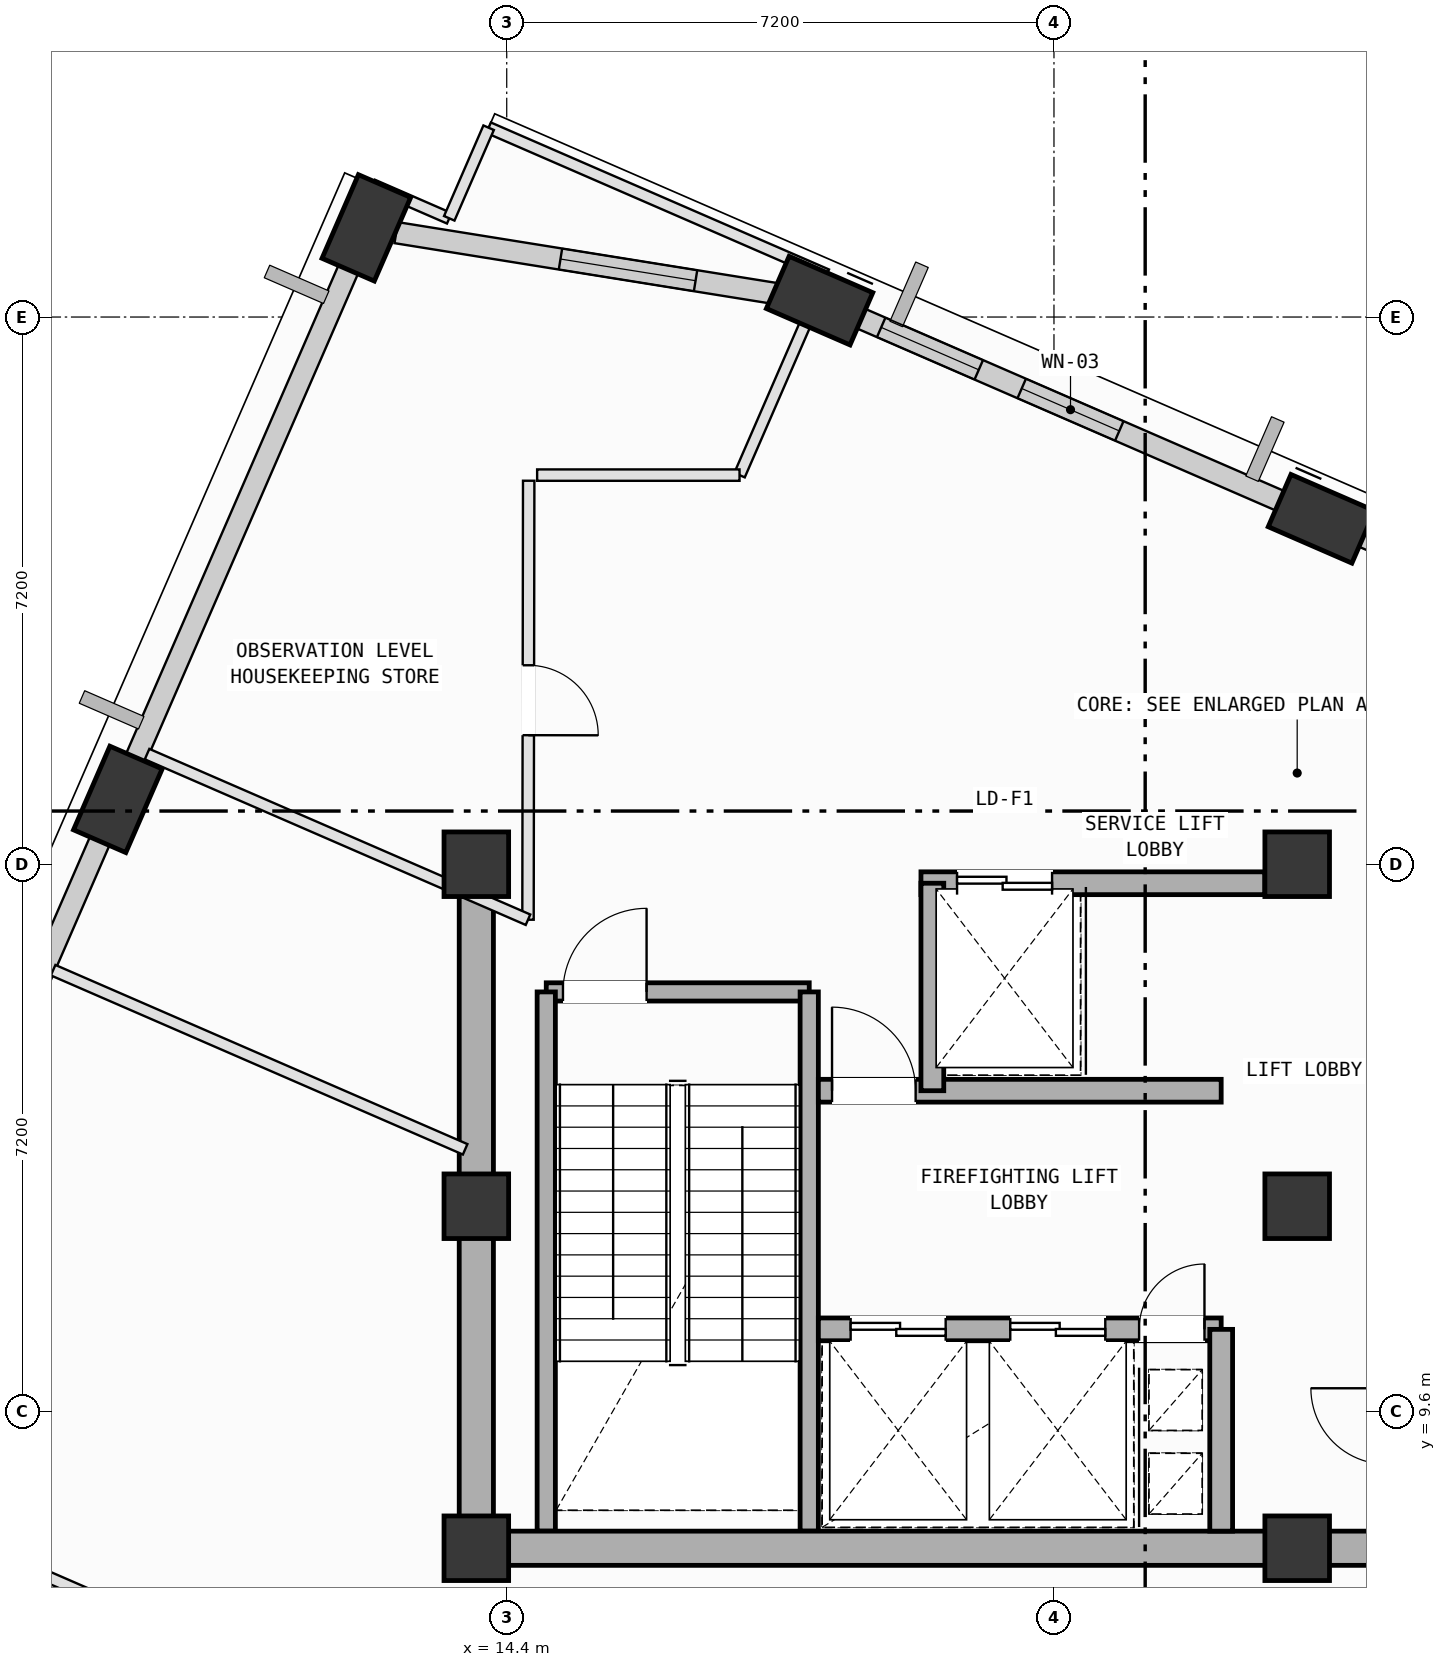
"""IFC4 building model, lengths in metres.
Left out: names, types, materials, properties, quantities, classifications, styles, units other than length and angle.
Written with IfcOpenShell. Run it as: python <this file> out.ifc"""

import sys

from ifc_helpers import new_model, si_unit, direction, frame, frame_2d, origin, origin_2d, place, context, subcontext, project, spatial, rectangle, extrude, element, fill, save


model = new_model("IFC4")
c1 = context("Model", 3, precision=1e-05, world=origin(), true_north=direction((0.0, 1.0)))
c2 = subcontext(c1, "Body", "Model", "MODEL_VIEW")
j1 = project(units=[si_unit("LENGTHUNIT", "METRE"), si_unit("PLANEANGLEUNIT", "RADIAN")], contexts=[c1])
p1 = place(None, origin())
s1 = spatial("IfcSite", under=j1, at=p1, CompositionType="ELEMENT")
p2 = place(p1, origin())
s2 = spatial("IfcBuilding", under=s1, at=p2, CompositionType="ELEMENT")
p3 = place(p2, frame((0.0, 0.0, 333.4)))
s3 = spatial("IfcBuildingStorey", under=s2, at=p3, CompositionType="ELEMENT", Elevation=333.4)
for number, where, z_axis, x_axis in (
    (1, (14.0, 7.8, 0.0), (0.0, 0.0, 1.0), (1.0, 0.0, 0.0)),
    (2, (14.0, 12.3, 0.0), (0.0, 0.0, 1.0), (1.0, 0.0, 0.0)),
    (3, (14.0, 16.8, 0.0), (0.0, 0.0, 1.0), (1.0, 0.0, 0.0)),
    (4, (24.8, 7.8, 0.0), (0.0, 0.0, 1.0), (1.0, 0.0, 0.0)),
    (5, (24.8, 12.3, 0.0), (0.0, 0.0, 1.0), (1.0, 0.0, 0.0)),
    (6, (24.8, 16.8, 0.0), (0.0, 0.0, 1.0), (1.0, 0.0, 0.0)),
):
    element("IfcColumn", number, at=place(p3, frame(where, z_axis=z_axis, x_axis=x_axis)), inside=s3, PredefinedType="COLUMN", context=c2, shape_type="SweptSolid", body=[
        extrude(rectangle(XDim=0.85, YDim=0.85, at=origin_2d()), origin(), (0.0, 0.0, 1.0), 4.8),
    ])
for number, where, z_axis, x_axis in (
    (7, (25.119, 21.345, 0.002), (0.0, 0.0, 1.0), (-0.917, 0.399, 0.0)),
    (8, (18.516, 24.216, 0.002), (0.0, 0.0, 1.0), (-0.917, 0.399, 0.0)),
    (9, (12.553, 25.173, 0.002), (0.0, 0.0, 1.0), (0.399, 0.917, 0.0)),
    (10, (9.283, 17.654, 0.002), (0.0, 0.0, 1.0), (0.399, 0.917, 0.0)),
):
    element("IfcColumn", number, at=place(p3, frame(where, z_axis=z_axis, x_axis=x_axis)), inside=s3, PredefinedType="COLUMN", context=c2, shape_type="SweptSolid", body=[
        extrude(rectangle(XDim=1.2, YDim=0.75, at=origin_2d()), origin(), (0.0, 0.0, 1.0), 4.796),
    ])
p4 = place(p3, frame((25.484, 21.187, 0.0), z_axis=(0.0, 0.0, 1.0), x_axis=(0.917060568388, -0.398747932794, 0.0)))
e11 = element("IfcWall", 11, at=p4, inside=s3, PredefinedType="SOLIDWALL", context=c2, shape_type="SweptSolid", body=[
    extrude(rectangle(XDim=6.955, YDim=0.28, at=frame_2d((3.478, 0.0))), origin(), (0.0, 0.0, 1.0), 3.485),
])
p5 = place(p3, frame((18.881, 24.058, 0.0), z_axis=(0.0, 0.0, 1.0), x_axis=(0.917070056253, -0.398726111414, 0.0)))
e12 = element("IfcWall", 12, at=p5, inside=s3, PredefinedType="SOLIDWALL", context=c2, shape_type="SweptSolid", body=[
    extrude(rectangle(XDim=6.405, YDim=0.28, at=frame_2d((3.202, 0.0))), origin(), (0.0, 0.0, 1.0), 3.985),
])
p6 = place(p5, frame((2.502, 0.0, 0.75)))
e13 = element("IfcOpeningElement", 13, at=p6, cuts=e12, PredefinedType="OPENING", context=c2, shape_type="SweptSolid", body=[
    extrude(rectangle(XDim=1.4, YDim=1.85, at=frame_2d((0.7, 0.925))), frame((0.0, 0.15, 0.0), z_axis=(0.0, -1.0, 0.0), x_axis=(1.0, 0.0, 0.0)), (0.0, 0.0, 1.0), 0.3),
])
p7 = place(p5, frame((0.486, 0.0, 0.75)))
e14 = element("IfcOpeningElement", 14, at=p7, cuts=e12, PredefinedType="OPENING", context=c2, shape_type="SweptSolid", body=[
    extrude(rectangle(XDim=1.4, YDim=1.85, at=frame_2d((0.7, 0.925))), frame((0.0, 0.15, 0.0), z_axis=(0.0, -1.0, 0.0), x_axis=(1.0, 0.0, 0.0)), (0.0, 0.0, 1.0), 0.3),
])
p8 = place(p3, frame((12.946, 25.11, 0.0), z_axis=(0.0, 0.0, 1.0), x_axis=(0.987363821305, -0.158469821666, 0.0)))
e15 = element("IfcWall", 15, at=p8, inside=s3, PredefinedType="SOLIDWALL", context=c2, shape_type="SweptSolid", body=[
    extrude(rectangle(XDim=5.244, YDim=0.28, at=frame_2d((2.622, 0.0))), origin(), (0.0, 0.0, 1.0), 3.985),
])
p9 = place(p8, frame((2.189, 0.0, 0.75)))
e16 = element("IfcOpeningElement", 16, at=p9, cuts=e15, PredefinedType="OPENING", context=c2, shape_type="SweptSolid", body=[
    extrude(rectangle(XDim=1.8, YDim=2.05, at=frame_2d((0.9, 1.025))), frame((0.0, 0.15, 0.0), z_axis=(0.0, -1.0, 0.0), x_axis=(1.0, 0.0, 0.0)), (0.0, 0.0, 1.0), 0.3),
])
p10 = place(p3, frame((9.442, 18.018, 0.0), z_axis=(0.0, 0.0, 1.0), x_axis=(0.398768305896, 0.917051709672, 0.0)))
e17 = element("IfcWall", 17, at=p10, inside=s3, PredefinedType="SOLIDWALL", context=c2, shape_type="SweptSolid", body=[
    extrude(rectangle(XDim=7.405, YDim=0.28, at=frame_2d((3.703, 0.0))), origin(), (0.0, 0.0, 1.0), 3.985),
])
p11 = place(p3, frame((6.172, 10.498, 0.0), z_axis=(0.0, 0.0, 1.0), x_axis=(0.398740578379, 0.917063766133, 0.0)))
e18 = element("IfcWall", 18, at=p11, inside=s3, PredefinedType="SOLIDWALL", context=c2, shape_type="SweptSolid", body=[
    extrude(rectangle(XDim=7.405, YDim=0.28, at=frame_2d((3.702, 0.0))), origin(), (0.0, 0.0, 1.0), 3.985),
])
p12 = place(p3, frame((8.509, 6.027, 0.0), z_axis=(0.0, 0.0, 1.0), x_axis=(-0.51924554751, 0.854625099907, 0.0)))
e19 = element("IfcWall", 19, at=p12, inside=s3, PredefinedType="SOLIDWALL", context=c2, shape_type="SweptSolid", body=[
    extrude(rectangle(XDim=4.407, YDim=0.28, at=frame_2d((2.204, 0.0))), origin(), (0.0, 0.0, 1.0), 3.985),
])
p13 = place(p3, frame((14.92, 15.12, 0.0), z_axis=(0.0, 0.0, 1.0), x_axis=(1.0, 0.0, 0.0)))
e20 = element("IfcWall", 20, at=p13, inside=s3, PredefinedType="SOLIDWALL", context=c2, shape_type="SweptSolid", body=[
    extrude(rectangle(XDim=3.46, YDim=0.24, at=frame_2d((1.73, 0.0))), origin(), (0.0, 0.0, 1.0), 4.5),
])
p14 = place(p13, frame((0.22, 0.0, 0.0)))
e21 = element("IfcOpeningElement", 21, at=p14, cuts=e20, PredefinedType="OPENING", context=c2, shape_type="SweptSolid", body=[
    extrude(rectangle(XDim=1.1, YDim=2.15, at=frame_2d((0.55, 1.075))), frame((0.0, 0.13, 0.0), z_axis=(0.0, -1.0, 0.0), x_axis=(1.0, 0.0, 0.0)), (0.0, 0.0, 1.0), 0.26),
])
for number, where, z_axis, x_axis in (
    (22, (18.38, 15.12, 0.0), (0.0, 0.0, 1.0), (0.0, -1.0, 0.0)),
    (23, (14.92, 8.025, 0.0), (0.0, 0.0, 1.0), (0.0, 1.0, 0.0)),
):
    element("IfcWall", number, at=place(p3, frame(where, z_axis=z_axis, x_axis=x_axis)), inside=s3, PredefinedType="SOLIDWALL", context=c2, shape_type="SweptSolid", body=[
        extrude(rectangle(XDim=7.095, YDim=0.24, at=frame_2d((3.548, 0.0))), origin(), (0.0, 0.0, 1.0), 4.5),
    ])
for number, where, z_axis, x_axis in (
    (24, (14.0, 7.8, 0.0), (0.0, 0.0, 1.0), (1.0, 0.0, 0.0)),
    (25, (24.8, 7.8, 0.0), (0.0, 0.0, 1.0), (1.0, 0.0, 0.0)),
):
    element("IfcWall", number, at=place(p3, frame(where, z_axis=z_axis, x_axis=x_axis)), inside=s3, PredefinedType="SHEAR", context=c2, shape_type="SweptSolid", body=[
        extrude(rectangle(XDim=10.8, YDim=0.45, at=frame_2d((5.4, 0.0))), origin(), (0.0, 0.0, 1.0), 4.5),
    ])
p15 = place(p3, frame((14.0, 16.8, 0.0), z_axis=(0.0, 0.0, 1.0), x_axis=(0.0, -1.0, 0.0)))
e26 = element("IfcWall", 26, at=p15, inside=s3, PredefinedType="SHEAR", context=c2, shape_type="SweptSolid", body=[
    extrude(rectangle(XDim=9.0, YDim=0.45, at=frame_2d((4.5, 0.0))), origin(), (0.0, 0.0, 1.0), 4.5),
])
p16 = place(p3, frame((19.85, 16.55, 0.0), z_axis=(0.0, 0.0, 1.0), x_axis=(1.0, 0.0, 0.0)))
e27 = element("IfcWall", 27, at=p16, inside=s3, PredefinedType="SOLIDWALL", context=c2, shape_type="SweptSolid", body=[
    extrude(rectangle(XDim=4.525, YDim=0.3, at=frame_2d((2.262, 0.0))), origin(), (0.0, 0.0, 1.0), 4.5),
])
p17 = place(p16, frame((0.475, 0.0, 0.0)))
e28 = element("IfcOpeningElement", 28, at=p17, cuts=e27, PredefinedType="OPENING", context=c2, shape_type="SweptSolid", body=[
    extrude(rectangle(XDim=1.25, YDim=2.18, at=frame_2d((0.625, 1.09))), frame((0.0, 0.16, 0.0), z_axis=(0.0, -1.0, 0.0), x_axis=(1.0, 0.0, 0.0)), (0.0, 0.0, 1.0), 0.32),
])
p18 = place(p3, frame((18.5, 10.68, 0.0), z_axis=(0.0, 0.0, 1.0), x_axis=(1.0, 0.0, 0.0)))
e29 = element("IfcWall", 29, at=p18, inside=s3, PredefinedType="SOLIDWALL", context=c2, shape_type="SweptSolid", body=[
    extrude(rectangle(XDim=5.3, YDim=0.3, at=frame_2d((2.65, 0.0))), origin(), (0.0, 0.0, 1.0), 4.5),
])
p19 = place(p18, frame((4.22, 0.0, 0.0)))
e30 = element("IfcOpeningElement", 30, at=p19, cuts=e29, PredefinedType="OPENING", context=c2, shape_type="SweptSolid", body=[
    extrude(rectangle(XDim=0.86, YDim=2.06, at=frame_2d((0.43, 1.03))), frame((0.0, 0.16, 0.0), z_axis=(0.0, -1.0, 0.0), x_axis=(1.0, 0.0, 0.0)), (0.0, 0.0, 1.0), 0.32),
])
p20 = place(p18, frame((0.425, 0.0, 0.0)))
e31 = element("IfcOpeningElement", 31, at=p20, cuts=e29, PredefinedType="OPENING", context=c2, shape_type="SweptSolid", body=[
    extrude(rectangle(XDim=1.25, YDim=2.18, at=frame_2d((0.625, 1.09))), frame((0.0, 0.16, 0.0), z_axis=(0.0, -1.0, 0.0), x_axis=(1.0, 0.0, 0.0)), (0.0, 0.0, 1.0), 0.32),
])
p21 = place(p18, frame((2.525, 0.0, 0.0)))
e32 = element("IfcOpeningElement", 32, at=p21, cuts=e29, PredefinedType="OPENING", context=c2, shape_type="SweptSolid", body=[
    extrude(rectangle(XDim=1.25, YDim=2.18, at=frame_2d((0.625, 1.09))), frame((0.0, 0.16, 0.0), z_axis=(0.0, -1.0, 0.0), x_axis=(1.0, 0.0, 0.0)), (0.0, 0.0, 1.0), 0.32),
])
p22 = place(p3, frame((18.5, 13.82, 0.0), z_axis=(0.0, 0.0, 1.0), x_axis=(1.0, 0.0, 0.0)))
e33 = element("IfcWall", 33, at=p22, inside=s3, PredefinedType="SOLIDWALL", context=c2, shape_type="SweptSolid", body=[
    extrude(rectangle(XDim=5.3, YDim=0.3, at=frame_2d((2.65, 0.0))), origin(), (0.0, 0.0, 1.0), 4.5),
])
p23 = place(p22, frame((0.18, 0.0, 0.0)))
e34 = element("IfcOpeningElement", 34, at=p23, cuts=e33, PredefinedType="OPENING", context=c2, shape_type="SweptSolid", body=[
    extrude(rectangle(XDim=1.1, YDim=2.15, at=frame_2d((0.55, 1.075))), frame((0.0, 0.16, 0.0), z_axis=(0.0, -1.0, 0.0), x_axis=(1.0, 0.0, 0.0)), (0.0, 0.0, 1.0), 0.32),
])
p24 = place(p3, frame((23.8, 8.025, 0.0), z_axis=(0.0, 0.0, 1.0), x_axis=(0.0, 1.0, 0.0)))
e35 = element("IfcWall", 35, at=p24, inside=s3, PredefinedType="SOLIDWALL", context=c2, shape_type="SweptSolid", body=[
    extrude(rectangle(XDim=2.655, YDim=0.3, at=frame_2d((1.328, 0.0))), origin(), (0.0, 0.0, 1.0), 4.5),
])
p25 = place(p3, frame((20.0, 13.82, 0.0), z_axis=(0.0, 0.0, 1.0), x_axis=(0.0, 1.0, 0.0)))
e36 = element("IfcWall", 36, at=p25, inside=s3, PredefinedType="SOLIDWALL", context=c2, shape_type="SweptSolid", body=[
    extrude(rectangle(XDim=2.73, YDim=0.3, at=frame_2d((1.365, 0.0))), origin(), (0.0, 0.0, 1.0), 4.5),
])
p26 = place(p3, frame((8.432, 15.406, 0.0), z_axis=(0.0, 0.0, 1.0), x_axis=(0.917075309006, -0.398714029865, 0.0)))
e37 = element("IfcWall", 37, at=p26, inside=s3, PredefinedType="PARTITIONING", context=c2, shape_type="SweptSolid", body=[
    extrude(rectangle(XDim=5.911, YDim=0.15, at=frame_2d((2.956, 0.0))), origin(), (0.0, 0.0, 1.0), 4.5),
])
p27 = place(p3, frame((32.403, -3.031, 0.0), z_axis=(0.0, 0.0, 1.0), x_axis=(-0.917060874319, 0.398747229197, 0.0)))
e38 = element("IfcWall", 38, at=p27, inside=s3, PredefinedType="PARTITIONING", context=c2, shape_type="SweptSolid", body=[
    extrude(rectangle(XDim=27.055, YDim=0.15, at=frame_2d((13.527, 0.0))), origin(), (0.0, 0.0, 1.0), 4.5),
])
p28 = place(p3, frame((14.162, 26.491, 0.0), z_axis=(0.0, 0.0, 1.0), x_axis=(0.917057251911, -0.39875556011, 0.0)))
e39 = element("IfcWall", 39, at=p28, inside=s3, PredefinedType="PARTITIONING", context=c2, shape_type="SweptSolid", body=[
    extrude(rectangle(XDim=4.85, YDim=0.15, at=frame_2d((2.425, 0.0))), origin(), (0.0, 0.0, 1.0), 3.985),
])
p29 = place(p3, frame((18.61, 24.557, 0.0), z_axis=(0.0, 0.0, 1.0), x_axis=(-0.398934093672, -0.916979601139, 0.0)))
e40 = element("IfcWall", 40, at=p29, inside=s3, PredefinedType="PARTITIONING", context=c2, shape_type="SweptSolid", body=[
    extrude(rectangle(XDim=2.876, YDim=0.15, at=frame_2d((1.438, 0.0))), origin(), (0.0, 0.0, 1.0), 3.485),
])
p30 = place(p3, frame((17.463, 21.92, 0.0), z_axis=(0.0, 0.0, 1.0), x_axis=(-1.0, 0.0, 0.0)))
e41 = element("IfcWall", 41, at=p30, inside=s3, PredefinedType="PARTITIONING", context=c2, shape_type="SweptSolid", body=[
    extrude(rectangle(XDim=2.663, YDim=0.15, at=frame_2d((1.332, 0.0))), origin(), (0.0, 0.0, 1.0), 4.5),
])
p31 = place(p3, frame((14.689, 21.846, 0.0), z_axis=(0.0, 0.0, 1.0), x_axis=(-0.001563951084, -0.999998777028, 0.0)))
e42 = element("IfcWall", 42, at=p31, inside=s3, PredefinedType="PARTITIONING", context=c2, shape_type="SweptSolid", body=[
    extrude(rectangle(XDim=5.776, YDim=0.15, at=frame_2d((2.888, 0.0))), origin(), (0.0, 0.0, 1.0), 4.5),
])
p32 = place(p31, frame((2.428, 0.0, 0.0)))
e43 = element("IfcOpeningElement", 43, at=p32, cuts=e42, PredefinedType="OPENING", context=c2, shape_type="SweptSolid", body=[
    extrude(rectangle(XDim=0.92, YDim=2.1, at=frame_2d((0.46, 1.05))), frame((0.0, 0.085, 0.0), z_axis=(0.0, -1.0, 0.0), x_axis=(1.0, 0.0, 0.0)), (0.0, 0.0, 1.0), 0.17),
])
p33 = place(p3, frame((14.68, 16.07, 0.0), z_axis=(0.0, 0.0, 1.0), x_axis=(-0.917080709133, 0.398701608895, 0.0)))
e44 = element("IfcWall", 44, at=p33, inside=s3, PredefinedType="PARTITIONING", context=c2, shape_type="SweptSolid", body=[
    extrude(rectangle(XDim=5.465, YDim=0.15, at=frame_2d((2.732, 0.0))), origin(), (0.0, 0.0, 1.0), 3.485),
])
p34 = place(p3, frame((12.257, 24.869, 0.0), z_axis=(0.0, 0.0, 1.0), x_axis=(0.398763788566, 0.917053673963, 0.0)))
e45 = element("IfcWall", 45, at=p34, inside=s3, PredefinedType="PARTITIONING", context=c2, shape_type="SweptSolid", body=[
    extrude(rectangle(XDim=0.948, YDim=0.15, at=frame_2d((0.474, 0.0))), origin(), (0.0, 0.0, 1.0), 3.985),
])
p35 = place(p3, frame((12.635, 25.738, 0.0), z_axis=(0.0, 0.0, 1.0), x_axis=(0.916985379611, -0.398920811164, 0.0)))
e46 = element("IfcWall", 46, at=p35, inside=s3, PredefinedType="PARTITIONING", context=c2, shape_type="SweptSolid", body=[
    extrude(rectangle(XDim=1.1, YDim=0.15, at=frame_2d((0.55, 0.0))), origin(), (0.0, 0.0, 1.0), 3.985),
])
p36 = place(p3, frame((13.644, 25.299, 0.0), z_axis=(0.0, 0.0, 1.0), x_axis=(0.398629941404, 0.917111863306, 0.0)))
e47 = element("IfcWall", 47, at=p36, inside=s3, PredefinedType="PARTITIONING", context=c2, shape_type="SweptSolid", body=[
    extrude(rectangle(XDim=1.3, YDim=0.15, at=frame_2d((0.65, 0.0))), origin(), (0.0, 0.0, 1.0), 4.5),
])
p37 = place(p6, origin())
e48 = element("IfcWindow", 48, at=p37, inside=s3, PartitioningType="SINGLE_PANEL", PredefinedType="WINDOW", context=c2, shape_type="SweptSolid", body=[
    extrude(rectangle(XDim=1.4, YDim=1.85, at=frame_2d((0.7, 0.925))), frame((0.0, 0.03, 0.0), z_axis=(0.0, -1.0, 0.0), x_axis=(1.0, 0.0, 0.0)), (0.0, 0.0, 1.0), 0.06),
])
fill(e13, e48)
p38 = place(p7, origin())
e49 = element("IfcWindow", 49, at=p38, inside=s3, PartitioningType="SINGLE_PANEL", PredefinedType="WINDOW", context=c2, shape_type="SweptSolid", body=[
    extrude(rectangle(XDim=1.4, YDim=1.85, at=frame_2d((0.7, 0.925))), frame((0.0, 0.03, 0.0), z_axis=(0.0, -1.0, 0.0), x_axis=(1.0, 0.0, 0.0)), (0.0, 0.0, 1.0), 0.06),
])
fill(e14, e49)
p39 = place(p9, origin())
e50 = element("IfcWindow", 50, at=p39, inside=s3, PartitioningType="SINGLE_PANEL", PredefinedType="WINDOW", context=c2, shape_type="SweptSolid", body=[
    extrude(rectangle(XDim=1.8, YDim=2.05, at=frame_2d((0.9, 1.025))), frame((0.0, 0.03, 0.0), z_axis=(0.0, -1.0, 0.0), x_axis=(1.0, 0.0, 0.0)), (0.0, 0.0, 1.0), 0.06),
])
fill(e16, e50)
p40 = place(p14, origin())
e51 = element("IfcDoor", 51, at=p40, inside=s3, OperationType="SINGLE_SWING_RIGHT", PredefinedType="DOOR", context=c2, shape_type="SweptSolid", body=[
    extrude(rectangle(XDim=1.1, YDim=2.15, at=frame_2d((0.55, 1.075))), frame((0.0, 0.025, 0.0), z_axis=(0.0, -1.0, 0.0), x_axis=(1.0, 0.0, 0.0)), (0.0, 0.0, 1.0), 0.05),
])
fill(e21, e51)
p41 = place(p19, origin())
e52 = element("IfcDoor", 52, at=p41, inside=s3, OperationType="SINGLE_SWING_RIGHT", PredefinedType="DOOR", context=c2, shape_type="SweptSolid", body=[
    extrude(rectangle(XDim=0.86, YDim=2.06, at=frame_2d((0.43, 1.03))), frame((0.0, 0.025, 0.0), z_axis=(0.0, -1.0, 0.0), x_axis=(1.0, 0.0, 0.0)), (0.0, 0.0, 1.0), 0.05),
])
fill(e30, e52)
p42 = place(p23, origin())
e53 = element("IfcDoor", 53, at=p42, inside=s3, OperationType="SINGLE_SWING_LEFT", PredefinedType="DOOR", context=c2, shape_type="SweptSolid", body=[
    extrude(rectangle(XDim=1.1, YDim=2.15, at=frame_2d((0.55, 1.075))), frame((0.0, 0.025, 0.0), z_axis=(0.0, -1.0, 0.0), x_axis=(1.0, 0.0, 0.0)), (0.0, 0.0, 1.0), 0.05),
])
fill(e34, e53)
p43 = place(p20, origin())
e54 = element("IfcDoor", 54, at=p43, inside=s3, OperationType="DOUBLE_DOOR_SLIDING", PredefinedType="DOOR", context=c2, shape_type="SweptSolid", body=[
    extrude(rectangle(XDim=1.25, YDim=2.18, at=frame_2d((0.625, 1.09))), frame((0.0, 0.025, 0.0), z_axis=(0.0, -1.0, 0.0), x_axis=(1.0, 0.0, 0.0)), (0.0, 0.0, 1.0), 0.05),
])
fill(e31, e54)
p44 = place(p21, origin())
e55 = element("IfcDoor", 55, at=p44, inside=s3, OperationType="DOUBLE_DOOR_SLIDING", PredefinedType="DOOR", context=c2, shape_type="SweptSolid", body=[
    extrude(rectangle(XDim=1.25, YDim=2.18, at=frame_2d((0.625, 1.09))), frame((0.0, 0.025, 0.0), z_axis=(0.0, -1.0, 0.0), x_axis=(1.0, 0.0, 0.0)), (0.0, 0.0, 1.0), 0.05),
])
fill(e32, e55)
p45 = place(p17, origin())
e56 = element("IfcDoor", 56, at=p45, inside=s3, OperationType="DOUBLE_DOOR_SLIDING", PredefinedType="DOOR", context=c2, shape_type="SweptSolid", body=[
    extrude(rectangle(XDim=1.25, YDim=2.18, at=frame_2d((0.625, 1.09))), frame((0.0, 0.025, 0.0), z_axis=(0.0, -1.0, 0.0), x_axis=(1.0, 0.0, 0.0)), (0.0, 0.0, 1.0), 0.05),
])
fill(e28, e56)
p46 = place(p32, origin())
e57 = element("IfcDoor", 57, at=p46, inside=s3, OperationType="SINGLE_SWING_RIGHT", PredefinedType="DOOR", context=c2, shape_type="SweptSolid", body=[
    extrude(rectangle(XDim=0.92, YDim=2.1, at=frame_2d((0.46, 1.05))), frame((0.0, 0.025, 0.0), z_axis=(0.0, -1.0, 0.0), x_axis=(1.0, 0.0, 0.0)), (0.0, 0.0, 1.0), 0.05),
])
fill(e43, e57)
save(model, sys.argv[1])
